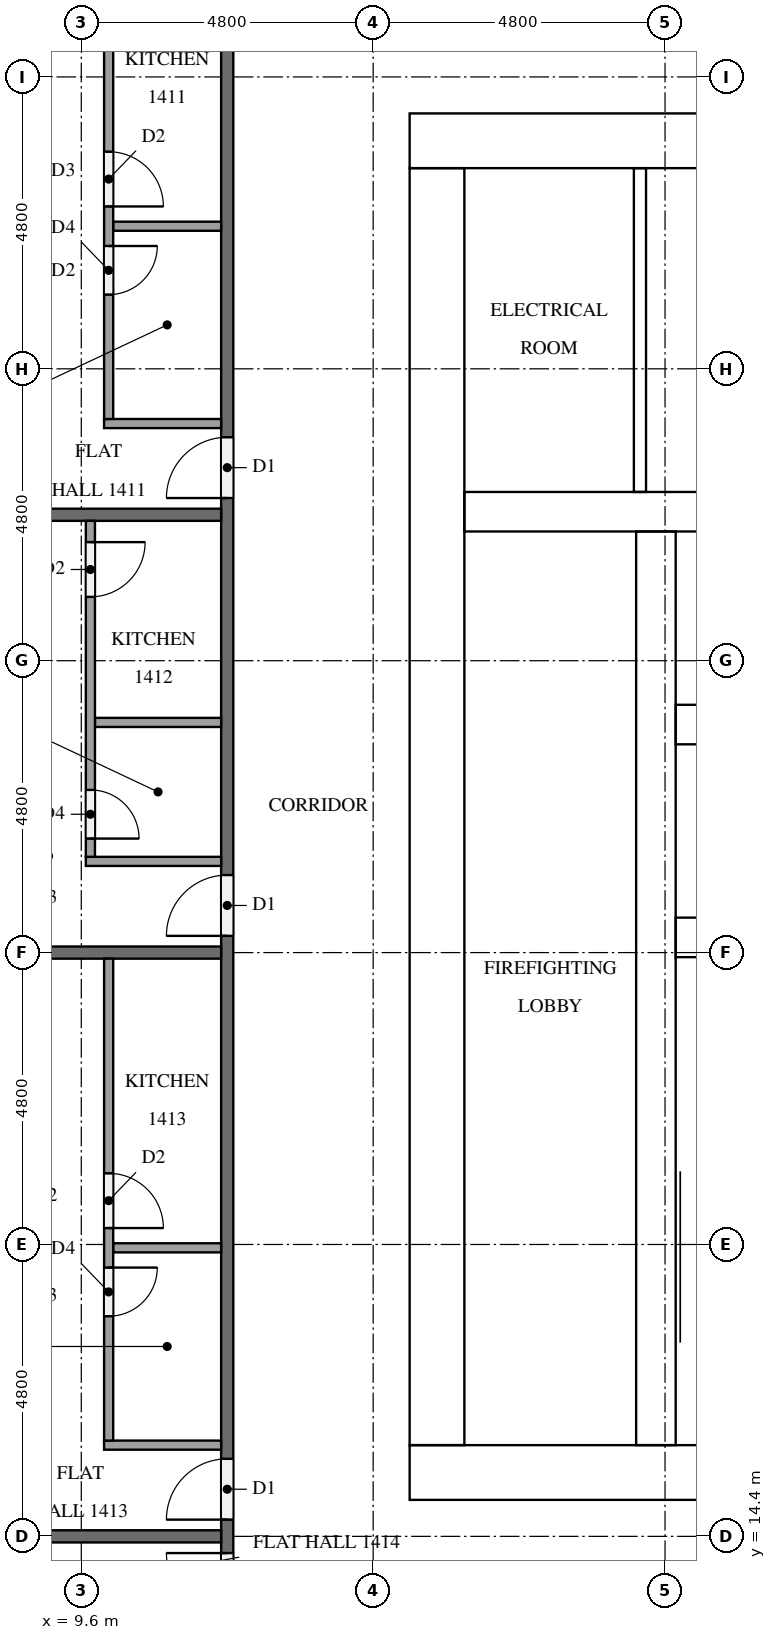
"""IFC4 building model, lengths in metres.
Left out: names, types, materials, properties, quantities, classifications, styles, units other than length and angle.
Written with IfcOpenShell. Run it as: python <this file> out.ifc"""

import sys

from ifc_helpers import new_model, si_unit, direction, frame, frame_2d, origin, place, context, subcontext, project, spatial, rectangle, extrude, element, fill, save


model = new_model("IFC4")
c1 = context("Model", 3, precision=1e-05, world=origin(), true_north=direction((0.0, 1.0)))
c2 = subcontext(c1, "Body", "Model", "MODEL_VIEW")
j1 = project(units=[si_unit("LENGTHUNIT", "METRE"), si_unit("PLANEANGLEUNIT", "RADIAN")], contexts=[c1])
p1 = place(None, origin())
s1 = spatial("IfcSite", under=j1, at=p1, CompositionType="ELEMENT")
p2 = place(p1, origin())
s2 = spatial("IfcBuilding", under=s1, at=p2, CompositionType="ELEMENT")
p3 = place(p2, frame((0.0, 0.0, 59.3)))
s3 = spatial("IfcBuildingStorey", under=s2, at=p3, CompositionType="ELEMENT", Elevation=59.3)
p4 = place(p3, frame((15.0, 15.45, 0.0), z_axis=(0.0, 0.0, 1.0), x_axis=(1.0, 0.0, 0.0)))
e1 = element("IfcWall", 1, at=p4, inside=s3, PredefinedType="SHEAR", context=c2, shape_type="SweptSolid", body=[
    extrude(rectangle(XDim=32.4, YDim=0.9, at=frame_2d((16.2, 0.0))), origin(), (0.0, 0.0, 1.0), 3.2),
])
p5 = place(p4, frame((15.3, 0.0, 0.0)))
e2 = element("IfcOpeningElement", 2, at=p5, cuts=e1, PredefinedType="OPENING", context=c2, shape_type="SweptSolid", body=[
    extrude(rectangle(XDim=1.8, YDim=2.1, at=frame_2d((0.9, 1.05))), frame((0.0, 0.46, 0.0), z_axis=(0.0, -1.0, 0.0), x_axis=(1.0, 0.0, 0.0)), (0.0, 0.0, 1.0), 0.92),
])
p6 = place(p3, frame((15.0, 37.35, 0.0), z_axis=(0.0, 0.0, 1.0), x_axis=(1.0, 0.0, 0.0)))
e3 = element("IfcWall", 3, at=p6, inside=s3, PredefinedType="SHEAR", context=c2, shape_type="SweptSolid", body=[
    extrude(rectangle(XDim=32.4, YDim=0.9, at=frame_2d((16.2, 0.0))), origin(), (0.0, 0.0, 1.0), 3.2),
])
p7 = place(p6, frame((15.3, 0.0, 0.0)))
e4 = element("IfcOpeningElement", 4, at=p7, cuts=e3, PredefinedType="OPENING", context=c2, shape_type="SweptSolid", body=[
    extrude(rectangle(XDim=1.8, YDim=2.1, at=frame_2d((0.9, 1.05))), frame((0.0, 0.46, 0.0), z_axis=(0.0, -1.0, 0.0), x_axis=(1.0, 0.0, 0.0)), (0.0, 0.0, 1.0), 0.92),
])
p8 = place(p6, frame((1.794, 0.0, 0.0)))
e5 = element("IfcOpeningElement", 5, at=p8, cuts=e3, PredefinedType="OPENING", context=c2, shape_type="SweptSolid", body=[
    extrude(rectangle(XDim=1.0, YDim=2.1, at=frame_2d((0.5, 1.05))), frame((0.0, 0.46, 0.0), z_axis=(0.0, -1.0, 0.0), x_axis=(1.0, 0.0, 0.0)), (0.0, 0.0, 1.0), 0.92),
])
p9 = place(p6, frame((5.331, 0.0, 0.0)))
e6 = element("IfcOpeningElement", 6, at=p9, cuts=e3, PredefinedType="OPENING", context=c2, shape_type="SweptSolid", body=[
    extrude(rectangle(XDim=1.0, YDim=2.1, at=frame_2d((0.5, 1.05))), frame((0.0, 0.46, 0.0), z_axis=(0.0, -1.0, 0.0), x_axis=(1.0, 0.0, 0.0)), (0.0, 0.0, 1.0), 0.92),
])
p10 = place(p3, frame((15.45, 15.9, 0.0), z_axis=(0.0, 0.0, 1.0), x_axis=(0.0, 1.0, 0.0)))
e7 = element("IfcWall", 7, at=p10, inside=s3, PredefinedType="SHEAR", context=c2, shape_type="SweptSolid", body=[
    extrude(rectangle(XDim=21.0, YDim=0.9, at=frame_2d((10.5, 0.0))), origin(), (0.0, 0.0, 1.0), 3.2),
])
p11 = place(p10, frame((4.86, 0.0, 0.0)))
e8 = element("IfcOpeningElement", 8, at=p11, cuts=e7, PredefinedType="OPENING", context=c2, shape_type="SweptSolid", body=[
    extrude(rectangle(XDim=1.2, YDim=2.1, at=frame_2d((0.6, 1.05))), frame((0.0, 0.46, 0.0), z_axis=(0.0, -1.0, 0.0), x_axis=(1.0, 0.0, 0.0)), (0.0, 0.0, 1.0), 0.92),
])
p12 = place(p3, frame((19.05, 15.9, 0.0), z_axis=(0.0, 0.0, 1.0), x_axis=(0.0, 1.0, 0.0)))
e9 = element("IfcWall", 9, at=p12, inside=s3, PredefinedType="SHEAR", context=c2, shape_type="SweptSolid", body=[
    extrude(rectangle(XDim=15.025, YDim=0.65, at=frame_2d((7.513, 0.0))), origin(), (0.0, 0.0, 1.0), 3.2),
])
p13 = place(p12, frame((9.55, 0.0, 0.0)))
e10 = element("IfcOpeningElement", 10, at=p13, cuts=e9, PredefinedType="OPENING", context=c2, shape_type="SweptSolid", body=[
    extrude(rectangle(XDim=1.1, YDim=2.1, at=frame_2d((0.55, 1.05))), frame((0.0, 0.335, 0.0), z_axis=(0.0, -1.0, 0.0), x_axis=(1.0, 0.0, 0.0)), (0.0, 0.0, 1.0), 0.67),
])
p14 = place(p12, frame((13.05, 0.0, 0.0)))
e11 = element("IfcOpeningElement", 11, at=p14, cuts=e9, PredefinedType="OPENING", context=c2, shape_type="SweptSolid", body=[
    extrude(rectangle(XDim=1.1, YDim=2.1, at=frame_2d((0.55, 1.05))), frame((0.0, 0.335, 0.0), z_axis=(0.0, -1.0, 0.0), x_axis=(1.0, 0.0, 0.0)), (0.0, 0.0, 1.0), 0.67),
])
p15 = place(p12, frame((0.3, 0.0, 0.0)))
e12 = element("IfcOpeningElement", 12, at=p15, cuts=e9, PredefinedType="OPENING", context=c2, shape_type="SweptSolid", body=[
    extrude(rectangle(XDim=1.2, YDim=2.1, at=frame_2d((0.6, 1.05))), frame((0.0, 0.335, 0.0), z_axis=(0.0, -1.0, 0.0), x_axis=(1.0, 0.0, 0.0)), (0.0, 0.0, 1.0), 0.67),
])
for number, where, z_axis, x_axis in (
    (13, (19.375, 24.25, 0.0), (0.0, 0.0, 1.0), (1.0, 0.0, 0.0)),
    (14, (19.375, 27.75, 0.0), (0.0, 0.0, 1.0), (1.0, 0.0, 0.0)),
):
    element("IfcWall", number, at=place(p3, frame(where, z_axis=z_axis, x_axis=x_axis)), inside=s3, PredefinedType="SHEAR", context=c2, shape_type="SweptSolid", body=[
        extrude(rectangle(XDim=3.4, YDim=0.65, at=frame_2d((1.7, 0.0))), origin(), (0.0, 0.0, 1.0), 3.2),
    ])
p16 = place(p3, frame((15.9, 31.25, 0.0), z_axis=(0.0, 0.0, 1.0), x_axis=(1.0, 0.0, 0.0)))
e15 = element("IfcWall", 15, at=p16, inside=s3, PredefinedType="SHEAR", context=c2, shape_type="SweptSolid", body=[
    extrude(rectangle(XDim=6.875, YDim=0.65, at=frame_2d((3.438, 0.0))), origin(), (0.0, 0.0, 1.0), 3.2),
])
p17 = place(p3, frame((18.788, 31.575, 0.0), z_axis=(0.0, 0.0, 1.0), x_axis=(0.0, 1.0, 0.0)))
e16 = element("IfcWall", 16, at=p17, inside=s3, PredefinedType="PARTITIONING", context=c2, shape_type="SweptSolid", body=[
    extrude(rectangle(XDim=5.325, YDim=0.2, at=frame_2d((2.663, 0.0))), origin(), (0.0, 0.0, 1.0), 3.2),
])
p18 = place(p3, frame((12.0, 12.1, 0.0), z_axis=(0.0, 0.0, 1.0), x_axis=(0.0, 1.0, 0.0)))
e17 = element("IfcWall", 17, at=p18, inside=s3, PredefinedType="PARTITIONING", context=c2, shape_type="SweptSolid", body=[
    extrude(rectangle(XDim=28.6, YDim=0.2, at=frame_2d((14.3, 0.0))), origin(), (0.0, 0.0, 1.0), 3.2),
])
p19 = place(p18, frame((19.375, 0.0, 0.0)))
e18 = element("IfcOpeningElement", 18, at=p19, cuts=e17, PredefinedType="OPENING", context=c2, shape_type="SweptSolid", body=[
    extrude(rectangle(XDim=1.0, YDim=2.1, at=frame_2d((0.5, 1.05))), frame((0.0, 0.11, 0.0), z_axis=(0.0, -1.0, 0.0), x_axis=(1.0, 0.0, 0.0)), (0.0, 0.0, 1.0), 0.22),
])
p20 = place(p18, frame((12.175, 0.0, 0.0)))
e19 = element("IfcOpeningElement", 19, at=p20, cuts=e17, PredefinedType="OPENING", context=c2, shape_type="SweptSolid", body=[
    extrude(rectangle(XDim=1.0, YDim=2.1, at=frame_2d((0.5, 1.05))), frame((0.0, 0.11, 0.0), z_axis=(0.0, -1.0, 0.0), x_axis=(1.0, 0.0, 0.0)), (0.0, 0.0, 1.0), 0.22),
])
p21 = place(p18, frame((2.575, 0.0, 0.0)))
e20 = element("IfcOpeningElement", 20, at=p21, cuts=e17, PredefinedType="OPENING", context=c2, shape_type="SweptSolid", body=[
    extrude(rectangle(XDim=1.0, YDim=2.1, at=frame_2d((0.5, 1.05))), frame((0.0, 0.11, 0.0), z_axis=(0.0, -1.0, 0.0), x_axis=(1.0, 0.0, 0.0)), (0.0, 0.0, 1.0), 0.22),
])
p22 = place(p18, frame((1.025, 0.0, 0.0)))
e21 = element("IfcOpeningElement", 21, at=p22, cuts=e17, PredefinedType="OPENING", context=c2, shape_type="SweptSolid", body=[
    extrude(rectangle(XDim=1.0, YDim=2.1, at=frame_2d((0.5, 1.05))), frame((0.0, 0.11, 0.0), z_axis=(0.0, -1.0, 0.0), x_axis=(1.0, 0.0, 0.0)), (0.0, 0.0, 1.0), 0.22),
])
p23 = place(p3, frame((4.9, 31.2, 0.0), z_axis=(0.0, 0.0, 1.0), x_axis=(1.0, 0.0, 0.0)))
e22 = element("IfcWall", 22, at=p23, inside=s3, PredefinedType="PARTITIONING", context=c2, shape_type="SweptSolid", body=[
    extrude(rectangle(XDim=7.0, YDim=0.2, at=frame_2d((3.5, 0.0))), origin(), (0.0, 0.0, 1.0), 3.2),
])
for number, where, z_axis, x_axis in (
    (23, (5.225, 24.0, 0.0), (0.0, 0.0, 1.0), (1.0, 0.0, 0.0)),
    (24, (5.225, 14.4, 0.0), (0.0, 0.0, 1.0), (1.0, 0.0, 0.0)),
):
    element("IfcWall", number, at=place(p3, frame(where, z_axis=z_axis, x_axis=x_axis)), inside=s3, PredefinedType="PARTITIONING", context=c2, shape_type="SweptSolid", body=[
        extrude(rectangle(XDim=6.675, YDim=0.2, at=frame_2d((3.337, 0.0))), origin(), (0.0, 0.0, 1.0), 3.2),
    ])
p24 = place(p3, frame((11.9, 35.945, 0.0), z_axis=(0.0, 0.0, 1.0), x_axis=(-1.0, 0.0, 0.0)))
e25 = element("IfcWall", 25, at=p24, inside=s3, PredefinedType="PARTITIONING", context=c2, shape_type="SweptSolid", body=[
    extrude(rectangle(XDim=1.775, YDim=0.15, at=frame_2d((0.887, 0.0))), origin(), (0.0, 0.0, 1.0), 3.2),
])
p25 = place(p3, frame((11.9, 32.7, 0.0), z_axis=(0.0, 0.0, 1.0), x_axis=(-1.0, 0.0, 0.0)))
e26 = element("IfcWall", 26, at=p25, inside=s3, PredefinedType="PARTITIONING", context=c2, shape_type="SweptSolid", body=[
    extrude(rectangle(XDim=1.925, YDim=0.15, at=frame_2d((0.962, 0.0))), origin(), (0.0, 0.0, 1.0), 3.2),
])
p26 = place(p3, frame((10.05, 40.7, 0.0), z_axis=(0.0, 0.0, 1.0), x_axis=(0.0, -1.0, 0.0)))
e27 = element("IfcWall", 27, at=p26, inside=s3, PredefinedType="PARTITIONING", context=c2, shape_type="SweptSolid", body=[
    extrude(rectangle(XDim=7.925, YDim=0.15, at=frame_2d((3.962, 0.0))), origin(), (0.0, 0.0, 1.0), 3.2),
])
p27 = place(p26, frame((5.08, 0.0, 0.0)))
e28 = element("IfcOpeningElement", 28, at=p27, cuts=e27, PredefinedType="OPENING", context=c2, shape_type="SweptSolid", body=[
    extrude(rectangle(XDim=0.8, YDim=2.1, at=frame_2d((0.4, 1.05))), frame((0.0, 0.085, 0.0), z_axis=(0.0, -1.0, 0.0), x_axis=(1.0, 0.0, 0.0)), (0.0, 0.0, 1.0), 0.17),
])
p28 = place(p26, frame((3.53, 0.0, 0.0)))
e29 = element("IfcOpeningElement", 29, at=p28, cuts=e27, PredefinedType="OPENING", context=c2, shape_type="SweptSolid", body=[
    extrude(rectangle(XDim=0.9, YDim=2.1, at=frame_2d((0.45, 1.05))), frame((0.0, 0.085, 0.0), z_axis=(0.0, -1.0, 0.0), x_axis=(1.0, 0.0, 0.0)), (0.0, 0.0, 1.0), 0.17),
])
p29 = place(p3, frame((11.9, 27.785, 0.0), z_axis=(0.0, 0.0, 1.0), x_axis=(-1.0, 0.0, 0.0)))
e30 = element("IfcWall", 30, at=p29, inside=s3, PredefinedType="PARTITIONING", context=c2, shape_type="SweptSolid", body=[
    extrude(rectangle(XDim=2.075, YDim=0.15, at=frame_2d((1.038, 0.0))), origin(), (0.0, 0.0, 1.0), 3.2),
])
p30 = place(p3, frame((11.9, 25.5, 0.0), z_axis=(0.0, 0.0, 1.0), x_axis=(-1.0, 0.0, 0.0)))
e31 = element("IfcWall", 31, at=p30, inside=s3, PredefinedType="PARTITIONING", context=c2, shape_type="SweptSolid", body=[
    extrude(rectangle(XDim=2.225, YDim=0.15, at=frame_2d((1.112, 0.0))), origin(), (0.0, 0.0, 1.0), 3.2),
])
p31 = place(p3, frame((9.75, 31.1, 0.0), z_axis=(0.0, 0.0, 1.0), x_axis=(0.0, -1.0, 0.0)))
e32 = element("IfcWall", 32, at=p31, inside=s3, PredefinedType="PARTITIONING", context=c2, shape_type="SweptSolid", body=[
    extrude(rectangle(XDim=5.525, YDim=0.15, at=frame_2d((2.763, 0.0))), origin(), (0.0, 0.0, 1.0), 3.2),
])
p32 = place(p31, frame((4.425, 0.0, 0.0)))
e33 = element("IfcOpeningElement", 33, at=p32, cuts=e32, PredefinedType="OPENING", context=c2, shape_type="SweptSolid", body=[
    extrude(rectangle(XDim=0.8, YDim=2.1, at=frame_2d((0.4, 1.05))), frame((0.0, 0.085, 0.0), z_axis=(0.0, -1.0, 0.0), x_axis=(1.0, 0.0, 0.0)), (0.0, 0.0, 1.0), 0.17),
])
p33 = place(p31, frame((0.35, 0.0, 0.0)))
e34 = element("IfcOpeningElement", 34, at=p33, cuts=e32, PredefinedType="OPENING", context=c2, shape_type="SweptSolid", body=[
    extrude(rectangle(XDim=0.9, YDim=2.1, at=frame_2d((0.45, 1.05))), frame((0.0, 0.085, 0.0), z_axis=(0.0, -1.0, 0.0), x_axis=(1.0, 0.0, 0.0)), (0.0, 0.0, 1.0), 0.17),
])
p34 = place(p3, frame((11.9, 19.145, 0.0), z_axis=(0.0, 0.0, 1.0), x_axis=(-1.0, 0.0, 0.0)))
e35 = element("IfcWall", 35, at=p34, inside=s3, PredefinedType="PARTITIONING", context=c2, shape_type="SweptSolid", body=[
    extrude(rectangle(XDim=1.775, YDim=0.15, at=frame_2d((0.887, 0.0))), origin(), (0.0, 0.0, 1.0), 3.2),
])
p35 = place(p3, frame((11.9, 15.9, 0.0), z_axis=(0.0, 0.0, 1.0), x_axis=(-1.0, 0.0, 0.0)))
e36 = element("IfcWall", 36, at=p35, inside=s3, PredefinedType="PARTITIONING", context=c2, shape_type="SweptSolid", body=[
    extrude(rectangle(XDim=1.925, YDim=0.15, at=frame_2d((0.962, 0.0))), origin(), (0.0, 0.0, 1.0), 3.2),
])
p36 = place(p3, frame((10.05, 23.9, 0.0), z_axis=(0.0, 0.0, 1.0), x_axis=(0.0, -1.0, 0.0)))
e37 = element("IfcWall", 37, at=p36, inside=s3, PredefinedType="PARTITIONING", context=c2, shape_type="SweptSolid", body=[
    extrude(rectangle(XDim=7.925, YDim=0.15, at=frame_2d((3.962, 0.0))), origin(), (0.0, 0.0, 1.0), 3.2),
])
p37 = place(p36, frame((5.08, 0.0, 0.0)))
e38 = element("IfcOpeningElement", 38, at=p37, cuts=e37, PredefinedType="OPENING", context=c2, shape_type="SweptSolid", body=[
    extrude(rectangle(XDim=0.8, YDim=2.1, at=frame_2d((0.4, 1.05))), frame((0.0, 0.085, 0.0), z_axis=(0.0, -1.0, 0.0), x_axis=(1.0, 0.0, 0.0)), (0.0, 0.0, 1.0), 0.17),
])
p38 = place(p36, frame((3.53, 0.0, 0.0)))
e39 = element("IfcOpeningElement", 39, at=p38, cuts=e37, PredefinedType="OPENING", context=c2, shape_type="SweptSolid", body=[
    extrude(rectangle(XDim=0.9, YDim=2.1, at=frame_2d((0.45, 1.05))), frame((0.0, 0.085, 0.0), z_axis=(0.0, -1.0, 0.0), x_axis=(1.0, 0.0, 0.0)), (0.0, 0.0, 1.0), 0.17),
])
p39 = place(p13, origin())
e40 = element("IfcDoor", 40, at=p39, inside=s3, OperationType="DOUBLE_DOOR_SLIDING", PredefinedType="DOOR", context=c2, shape_type="SweptSolid", body=[
    extrude(rectangle(XDim=1.1, YDim=2.1, at=frame_2d((0.55, 1.05))), frame((0.0, 0.025, 0.0), z_axis=(0.0, -1.0, 0.0), x_axis=(1.0, 0.0, 0.0)), (0.0, 0.0, 1.0), 0.05),
])
fill(e10, e40)
p40 = place(p14, origin())
e41 = element("IfcDoor", 41, at=p40, inside=s3, OperationType="DOUBLE_DOOR_SLIDING", PredefinedType="DOOR", context=c2, shape_type="SweptSolid", body=[
    extrude(rectangle(XDim=1.1, YDim=2.1, at=frame_2d((0.55, 1.05))), frame((0.0, 0.025, 0.0), z_axis=(0.0, -1.0, 0.0), x_axis=(1.0, 0.0, 0.0)), (0.0, 0.0, 1.0), 0.05),
])
fill(e11, e41)
p41 = place(p15, frame((1.2, 0.0, 0.0), z_axis=(0.0, 0.0, 1.0), x_axis=(-1.0, 0.0, 0.0)))
e42 = element("IfcDoor", 42, at=p41, inside=s3, OperationType="SINGLE_SWING_RIGHT", PredefinedType="DOOR", context=c2, shape_type="SweptSolid", body=[
    extrude(rectangle(XDim=1.2, YDim=2.1, at=frame_2d((0.6, 1.05))), frame((0.0, 0.025, 0.0), z_axis=(0.0, -1.0, 0.0), x_axis=(1.0, 0.0, 0.0)), (0.0, 0.0, 1.0), 0.05),
])
fill(e12, e42)
p42 = place(p11, frame((1.2, 0.0, 0.0), z_axis=(0.0, 0.0, 1.0), x_axis=(-1.0, 0.0, 0.0)))
e43 = element("IfcDoor", 43, at=p42, inside=s3, OperationType="SINGLE_SWING_LEFT", PredefinedType="DOOR", context=c2, shape_type="SweptSolid", body=[
    extrude(rectangle(XDim=1.2, YDim=2.1, at=frame_2d((0.6, 1.05))), frame((0.0, 0.025, 0.0), z_axis=(0.0, -1.0, 0.0), x_axis=(1.0, 0.0, 0.0)), (0.0, 0.0, 1.0), 0.05),
])
fill(e8, e43)
p43 = place(p8, origin())
e44 = element("IfcDoor", 44, at=p43, inside=s3, OperationType="SINGLE_SWING_LEFT", PredefinedType="DOOR", context=c2, shape_type="SweptSolid", body=[
    extrude(rectangle(XDim=1.0, YDim=2.1, at=frame_2d((0.5, 1.05))), frame((0.0, 0.025, 0.0), z_axis=(0.0, -1.0, 0.0), x_axis=(1.0, 0.0, 0.0)), (0.0, 0.0, 1.0), 0.05),
])
fill(e5, e44)
p44 = place(p19, origin())
e45 = element("IfcDoor", 45, at=p44, inside=s3, OperationType="SINGLE_SWING_LEFT", PredefinedType="DOOR", context=c2, shape_type="SweptSolid", body=[
    extrude(rectangle(XDim=1.0, YDim=2.1, at=frame_2d((0.5, 1.05))), frame((0.0, 0.025, 0.0), z_axis=(0.0, -1.0, 0.0), x_axis=(1.0, 0.0, 0.0)), (0.0, 0.0, 1.0), 0.05),
])
fill(e18, e45)
p45 = place(p20, origin())
e46 = element("IfcDoor", 46, at=p45, inside=s3, OperationType="SINGLE_SWING_LEFT", PredefinedType="DOOR", context=c2, shape_type="SweptSolid", body=[
    extrude(rectangle(XDim=1.0, YDim=2.1, at=frame_2d((0.5, 1.05))), frame((0.0, 0.025, 0.0), z_axis=(0.0, -1.0, 0.0), x_axis=(1.0, 0.0, 0.0)), (0.0, 0.0, 1.0), 0.05),
])
fill(e19, e46)
p46 = place(p21, origin())
e47 = element("IfcDoor", 47, at=p46, inside=s3, OperationType="SINGLE_SWING_LEFT", PredefinedType="DOOR", context=c2, shape_type="SweptSolid", body=[
    extrude(rectangle(XDim=1.0, YDim=2.1, at=frame_2d((0.5, 1.05))), frame((0.0, 0.025, 0.0), z_axis=(0.0, -1.0, 0.0), x_axis=(1.0, 0.0, 0.0)), (0.0, 0.0, 1.0), 0.05),
])
fill(e20, e47)
p47 = place(p22, origin())
e48 = element("IfcDoor", 48, at=p47, inside=s3, OperationType="SINGLE_SWING_RIGHT", PredefinedType="DOOR", context=c2, shape_type="SweptSolid", body=[
    extrude(rectangle(XDim=1.0, YDim=2.1, at=frame_2d((0.5, 1.05))), frame((0.0, 0.025, 0.0), z_axis=(0.0, -1.0, 0.0), x_axis=(1.0, 0.0, 0.0)), (0.0, 0.0, 1.0), 0.05),
])
fill(e21, e48)
p48 = place(p27, origin())
e49 = element("IfcDoor", 49, at=p48, inside=s3, OperationType="SINGLE_SWING_LEFT", PredefinedType="DOOR", context=c2, shape_type="SweptSolid", body=[
    extrude(rectangle(XDim=0.8, YDim=2.1, at=frame_2d((0.4, 1.05))), frame((0.0, 0.025, 0.0), z_axis=(0.0, -1.0, 0.0), x_axis=(1.0, 0.0, 0.0)), (0.0, 0.0, 1.0), 0.05),
])
fill(e28, e49)
p49 = place(p28, origin())
e50 = element("IfcDoor", 50, at=p49, inside=s3, OperationType="SINGLE_SWING_RIGHT", PredefinedType="DOOR", context=c2, shape_type="SweptSolid", body=[
    extrude(rectangle(XDim=0.9, YDim=2.1, at=frame_2d((0.45, 1.05))), frame((0.0, 0.025, 0.0), z_axis=(0.0, -1.0, 0.0), x_axis=(1.0, 0.0, 0.0)), (0.0, 0.0, 1.0), 0.05),
])
fill(e29, e50)
p50 = place(p32, origin())
e51 = element("IfcDoor", 51, at=p50, inside=s3, OperationType="SINGLE_SWING_RIGHT", PredefinedType="DOOR", context=c2, shape_type="SweptSolid", body=[
    extrude(rectangle(XDim=0.8, YDim=2.1, at=frame_2d((0.4, 1.05))), frame((0.0, 0.025, 0.0), z_axis=(0.0, -1.0, 0.0), x_axis=(1.0, 0.0, 0.0)), (0.0, 0.0, 1.0), 0.05),
])
fill(e33, e51)
p51 = place(p33, origin())
e52 = element("IfcDoor", 52, at=p51, inside=s3, OperationType="SINGLE_SWING_LEFT", PredefinedType="DOOR", context=c2, shape_type="SweptSolid", body=[
    extrude(rectangle(XDim=0.9, YDim=2.1, at=frame_2d((0.45, 1.05))), frame((0.0, 0.025, 0.0), z_axis=(0.0, -1.0, 0.0), x_axis=(1.0, 0.0, 0.0)), (0.0, 0.0, 1.0), 0.05),
])
fill(e34, e52)
p52 = place(p37, origin())
e53 = element("IfcDoor", 53, at=p52, inside=s3, OperationType="SINGLE_SWING_LEFT", PredefinedType="DOOR", context=c2, shape_type="SweptSolid", body=[
    extrude(rectangle(XDim=0.8, YDim=2.1, at=frame_2d((0.4, 1.05))), frame((0.0, 0.025, 0.0), z_axis=(0.0, -1.0, 0.0), x_axis=(1.0, 0.0, 0.0)), (0.0, 0.0, 1.0), 0.05),
])
fill(e38, e53)
p53 = place(p38, origin())
e54 = element("IfcDoor", 54, at=p53, inside=s3, OperationType="SINGLE_SWING_RIGHT", PredefinedType="DOOR", context=c2, shape_type="SweptSolid", body=[
    extrude(rectangle(XDim=0.9, YDim=2.1, at=frame_2d((0.45, 1.05))), frame((0.0, 0.025, 0.0), z_axis=(0.0, -1.0, 0.0), x_axis=(1.0, 0.0, 0.0)), (0.0, 0.0, 1.0), 0.05),
])
fill(e39, e54)
save(model, sys.argv[1])
